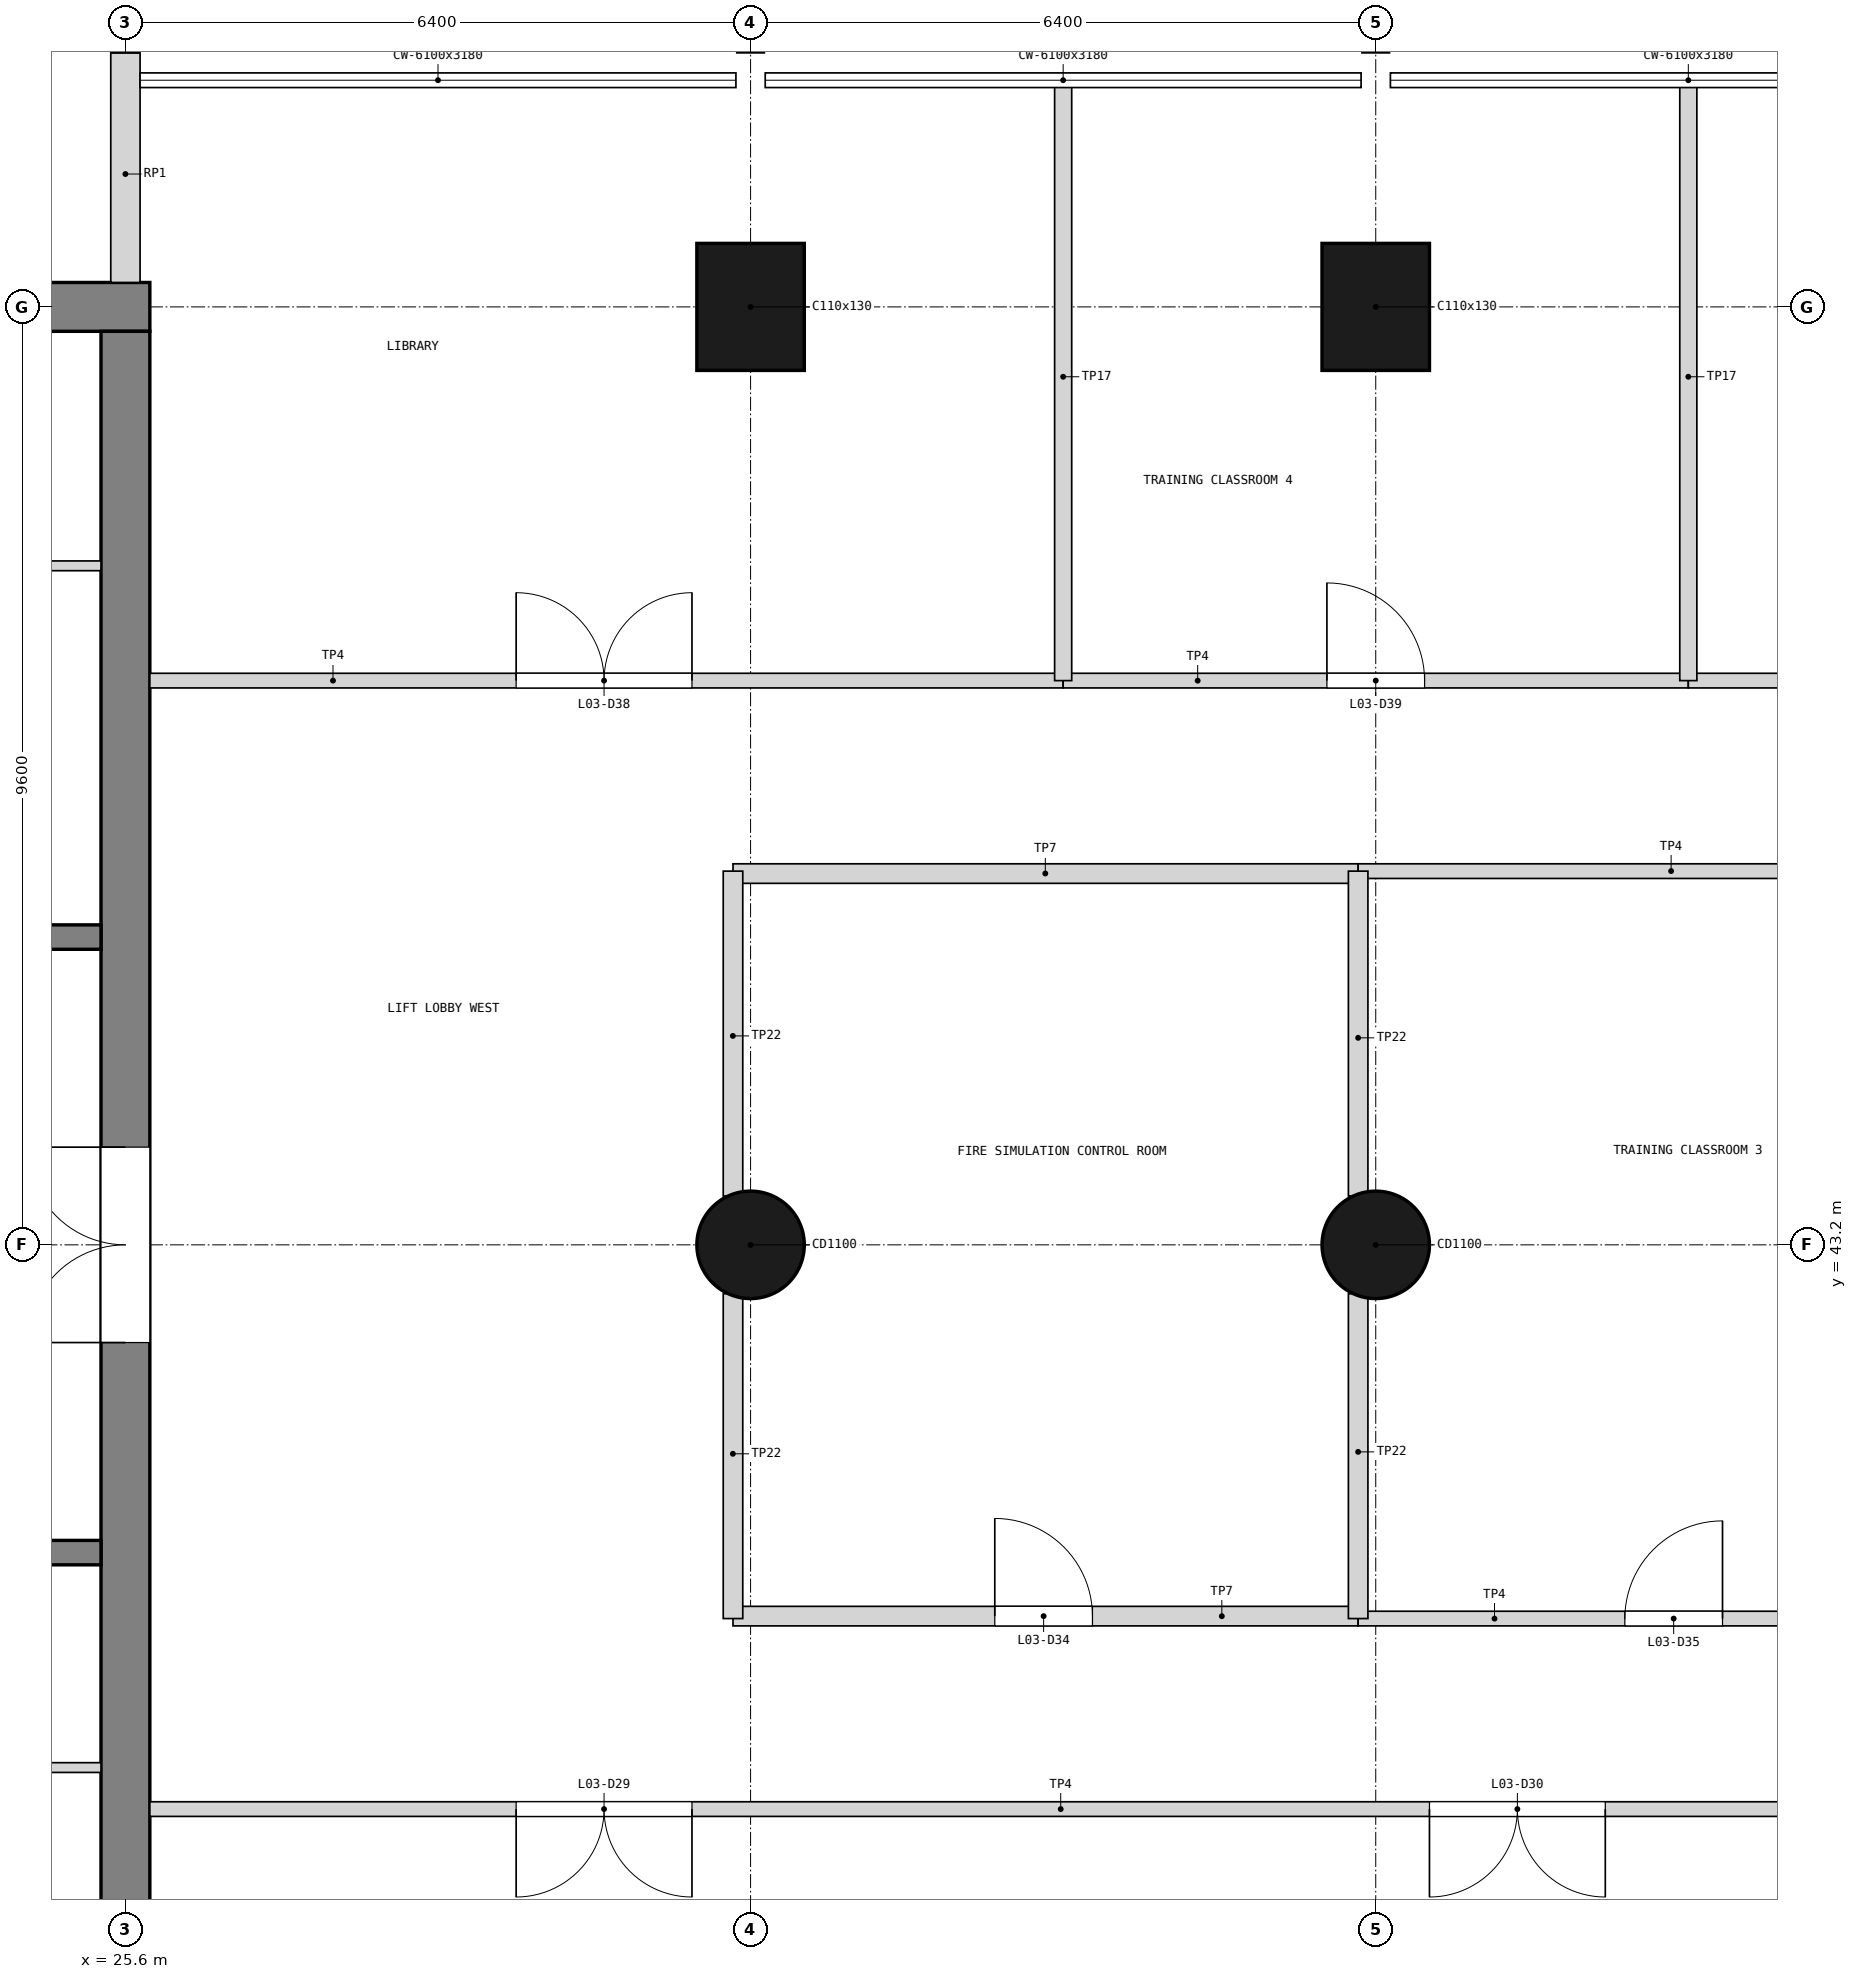
"""IFC4 building model, lengths in metres.
Left out: names, types, materials, properties, quantities, classifications, styles, units other than length and angle.
Written with IfcOpenShell. Run it as: python <this file> out.ifc"""

import sys

from ifc_helpers import new_model, si_unit, direction, frame, frame_2d, origin, origin_2d, place, context, subcontext, project, spatial, rectangle, circle, extrude, element, fill, save


model = new_model("IFC4")
c1 = context("Model", 3, precision=1e-05, world=origin(), true_north=direction((0.0, 1.0)))
c2 = subcontext(c1, "Body", "Model", "MODEL_VIEW")
j1 = project(units=[si_unit("LENGTHUNIT", "METRE"), si_unit("PLANEANGLEUNIT", "RADIAN")], contexts=[c1])
p1 = place(None, origin())
s1 = spatial("IfcSite", under=j1, at=p1, CompositionType="ELEMENT")
p2 = place(p1, origin())
s2 = spatial("IfcBuilding", under=s1, at=p2, CompositionType="ELEMENT")
p3 = place(p2, frame((0.0, 0.0, 12.9)))
s3 = spatial("IfcBuildingStorey", under=s2, at=p3, CompositionType="ELEMENT", Elevation=12.9)
p4 = place(p3, frame((12.55, 52.8, 0.0), z_axis=(0.0, 0.0, 1.0), x_axis=(1.0, 0.0, 0.0)))
e1 = element("IfcWall", 1, at=p4, inside=s3, PredefinedType="SHEAR", context=c2, shape_type="SweptSolid", body=[
    extrude(rectangle(XDim=13.3, YDim=0.5, at=frame_2d((6.65, 0.0))), origin(), (0.0, 0.0, 1.0), 4.2),
])
p5 = place(p4, frame((1.85, 0.0, 1.0)))
e2 = element("IfcOpeningElement", 2, at=p5, cuts=e1, PredefinedType="OPENING", context=c2, shape_type="SweptSolid", body=[
    extrude(rectangle(XDim=0.4, YDim=2.0, at=frame_2d((0.2, 1.0))), frame((0.0, 0.26, 0.0), z_axis=(0.0, -1.0, 0.0), x_axis=(1.0, 0.0, 0.0)), (0.0, 0.0, 1.0), 0.52),
])
p6 = place(p3, frame((25.6, 33.85, 0.0), z_axis=(0.0, 0.0, 1.0), x_axis=(0.0, 1.0, 0.0)))
e3 = element("IfcWall", 3, at=p6, inside=s3, PredefinedType="SHEAR", context=c2, shape_type="SweptSolid", body=[
    extrude(rectangle(XDim=18.7, YDim=0.5, at=frame_2d((9.35, 0.0))), origin(), (0.0, 0.0, 1.0), 4.2),
])
p7 = place(p6, frame((8.35, 0.0, 0.0)))
e4 = element("IfcOpeningElement", 4, at=p7, cuts=e3, PredefinedType="OPENING", context=c2, shape_type="SweptSolid", body=[
    extrude(rectangle(XDim=2.0, YDim=2.1, at=frame_2d((1.0, 1.05))), frame((0.0, 0.26, 0.0), z_axis=(0.0, -1.0, 0.0), x_axis=(1.0, 0.0, 0.0)), (0.0, 0.0, 1.0), 0.52),
])
p8 = place(p3, frame((32.0, 43.2, 0.0), z_axis=(0.0, 0.0, 1.0), x_axis=(1.0, 0.0, 0.0)))
e5 = element("IfcColumn", 5, at=p8, inside=s3, PredefinedType="COLUMN", context=c2, shape_type="SweptSolid", body=[
    extrude(circle(Radius=0.55, at=origin_2d()), origin(), (0.0, 0.0, 1.0), 4.2),
])
p9 = place(p3, frame((32.0, 52.8, 0.0), z_axis=(0.0, 0.0, 1.0), x_axis=(1.0, 0.0, 0.0)))
e6 = element("IfcColumn", 6, at=p9, inside=s3, PredefinedType="COLUMN", context=c2, shape_type="SweptSolid", body=[
    extrude(rectangle(XDim=1.1, YDim=1.3, at=origin_2d()), origin(), (0.0, 0.0, 1.0), 4.2),
])
p10 = place(p3, frame((38.4, 43.2, 0.0), z_axis=(0.0, 0.0, 1.0), x_axis=(1.0, 0.0, 0.0)))
e7 = element("IfcColumn", 7, at=p10, inside=s3, PredefinedType="COLUMN", context=c2, shape_type="SweptSolid", body=[
    extrude(circle(Radius=0.55, at=origin_2d()), origin(), (0.0, 0.0, 1.0), 4.2),
])
p11 = place(p3, frame((38.4, 52.8, 0.0), z_axis=(0.0, 0.0, 1.0), x_axis=(1.0, 0.0, 0.0)))
e8 = element("IfcColumn", 8, at=p11, inside=s3, PredefinedType="COLUMN", context=c2, shape_type="SweptSolid", body=[
    extrude(rectangle(XDim=1.1, YDim=1.3, at=origin_2d()), origin(), (0.0, 0.0, 1.0), 4.2),
])
p12 = place(p3, frame((25.6, 53.05, 0.0), z_axis=(0.0, 0.0, 1.0), x_axis=(0.0, 1.0, 0.0)))
e9 = element("IfcWall", 9, at=p12, inside=s3, PredefinedType="SOLIDWALL", context=c2, shape_type="SweptSolid", body=[
    extrude(rectangle(XDim=2.35, YDim=0.3, at=frame_2d((1.175, 0.0))), origin(), (0.0, 0.0, 1.0), 3.18),
])
for number, where, z_axis, x_axis in (
    (10, (19.875, 40.05, 0.0), (0.0, 0.0, 1.0), (1.0, 0.0, 0.0)),
    (11, (19.875, 46.35, 0.0), (0.0, 0.0, 1.0), (1.0, 0.0, 0.0)),
):
    element("IfcWall", number, at=place(p3, frame(where, z_axis=z_axis, x_axis=x_axis)), inside=s3, PredefinedType="SOLIDWALL", context=c2, shape_type="SweptSolid", body=[
        extrude(rectangle(XDim=5.475, YDim=0.25, at=frame_2d((2.738, 0.0))), origin(), (0.0, 0.0, 1.0), 3.9),
    ])
p13 = place(p3, frame((21.675, 37.85, 0.0), z_axis=(0.0, 0.0, 1.0), x_axis=(1.0, 0.0, 0.0)))
e12 = element("IfcWall", 12, at=p13, inside=s3, PredefinedType="PARTITIONING", context=c2, shape_type="SweptSolid", body=[
    extrude(rectangle(XDim=3.675, YDim=0.1, at=frame_2d((1.837, 0.0))), origin(), (0.0, 0.0, 1.0), 3.9),
])
p14 = place(p3, frame((20.125, 50.15, 0.0), z_axis=(0.0, 0.0, 1.0), x_axis=(1.0, 0.0, 0.0)))
e13 = element("IfcWall", 13, at=p14, inside=s3, PredefinedType="PARTITIONING", context=c2, shape_type="SweptSolid", body=[
    extrude(rectangle(XDim=5.225, YDim=0.1, at=frame_2d((2.613, 0.0))), origin(), (0.0, 0.0, 1.0), 3.9),
])
p15 = place(p3, frame((25.85, 37.425, 0.0), z_axis=(0.0, 0.0, 1.0), x_axis=(1.0, 0.0, 0.0)))
e14 = element("IfcWall", 14, at=p15, inside=s3, PredefinedType="PARTITIONING", context=c2, shape_type="SweptSolid", body=[
    extrude(rectangle(XDim=18.77, YDim=0.15, at=frame_2d((9.385, 0.0))), origin(), (0.0, 0.0, 1.0), 3.98),
])
p16 = place(p15, frame((3.75, 0.0, 0.0)))
e15 = element("IfcOpeningElement", 15, at=p16, cuts=e14, PredefinedType="OPENING", context=c2, shape_type="SweptSolid", body=[
    extrude(rectangle(XDim=1.8, YDim=2.1, at=frame_2d((0.9, 1.05))), frame((0.0, 0.085, 0.0), z_axis=(0.0, -1.0, 0.0), x_axis=(1.0, 0.0, 0.0)), (0.0, 0.0, 1.0), 0.17),
])
p17 = place(p15, frame((13.1, 0.0, 0.0)))
e16 = element("IfcOpeningElement", 16, at=p17, cuts=e14, PredefinedType="OPENING", context=c2, shape_type="SweptSolid", body=[
    extrude(rectangle(XDim=1.8, YDim=2.1, at=frame_2d((0.9, 1.05))), frame((0.0, 0.085, 0.0), z_axis=(0.0, -1.0, 0.0), x_axis=(1.0, 0.0, 0.0)), (0.0, 0.0, 1.0), 0.17),
])
p18 = place(p3, frame((31.82, 39.4, 0.0), z_axis=(0.0, 0.0, 1.0), x_axis=(1.0, 0.0, 0.0)))
e17 = element("IfcWall", 17, at=p18, inside=s3, PredefinedType="PARTITIONING", context=c2, shape_type="SweptSolid", body=[
    extrude(rectangle(XDim=6.4, YDim=0.2, at=frame_2d((3.2, 0.0))), origin(), (0.0, 0.0, 1.0), 3.98),
])
p19 = place(p18, frame((2.68, 0.0, 0.0)))
e18 = element("IfcOpeningElement", 18, at=p19, cuts=e17, PredefinedType="OPENING", context=c2, shape_type="SweptSolid", body=[
    extrude(rectangle(XDim=1.0, YDim=2.1, at=frame_2d((0.5, 1.05))), frame((0.0, 0.11, 0.0), z_axis=(0.0, -1.0, 0.0), x_axis=(1.0, 0.0, 0.0)), (0.0, 0.0, 1.0), 0.22),
])
p20 = place(p3, frame((31.82, 47.0, 0.0), z_axis=(0.0, 0.0, 1.0), x_axis=(1.0, 0.0, 0.0)))
e19 = element("IfcWall", 19, at=p20, inside=s3, PredefinedType="PARTITIONING", context=c2, shape_type="SweptSolid", body=[
    extrude(rectangle(XDim=6.4, YDim=0.2, at=frame_2d((3.2, 0.0))), origin(), (0.0, 0.0, 1.0), 3.98),
])
p21 = place(p3, frame((38.22, 39.375, 0.0), z_axis=(0.0, 0.0, 1.0), x_axis=(1.0, 0.0, 0.0)))
e20 = element("IfcWall", 20, at=p21, inside=s3, PredefinedType="PARTITIONING", context=c2, shape_type="SweptSolid", body=[
    extrude(rectangle(XDim=6.4, YDim=0.15, at=frame_2d((3.2, 0.0))), origin(), (0.0, 0.0, 1.0), 3.98),
])
p22 = place(p21, frame((2.73, 0.0, 0.0)))
e21 = element("IfcOpeningElement", 21, at=p22, cuts=e20, PredefinedType="OPENING", context=c2, shape_type="SweptSolid", body=[
    extrude(rectangle(XDim=1.0, YDim=2.1, at=frame_2d((0.5, 1.05))), frame((0.0, 0.085, 0.0), z_axis=(0.0, -1.0, 0.0), x_axis=(1.0, 0.0, 0.0)), (0.0, 0.0, 1.0), 0.17),
])
p23 = place(p3, frame((38.22, 47.025, 0.0), z_axis=(0.0, 0.0, 1.0), x_axis=(1.0, 0.0, 0.0)))
e22 = element("IfcWall", 22, at=p23, inside=s3, PredefinedType="PARTITIONING", context=c2, shape_type="SweptSolid", body=[
    extrude(rectangle(XDim=6.4, YDim=0.15, at=frame_2d((3.2, 0.0))), origin(), (0.0, 0.0, 1.0), 3.98),
])
for number, where, z_axis, x_axis in (
    (23, (38.22, 39.375, 0.0), (0.0, 0.0, 1.0), (0.0, 1.0, 0.0)),
    (24, (38.22, 43.7, 0.0), (0.0, 0.0, 1.0), (0.0, 1.0, 0.0)),
):
    element("IfcWall", number, at=place(p3, frame(where, z_axis=z_axis, x_axis=x_axis)), inside=s3, PredefinedType="PARTITIONING", context=c2, shape_type="SweptSolid", body=[
        extrude(rectangle(XDim=3.325, YDim=0.2, at=frame_2d((1.663, 0.0))), origin(), (0.0, 0.0, 1.0), 3.08),
    ])
p24 = place(p3, frame((25.85, 48.975, 0.0), z_axis=(0.0, 0.0, 1.0), x_axis=(1.0, 0.0, 0.0)))
e25 = element("IfcWall", 25, at=p24, inside=s3, PredefinedType="PARTITIONING", context=c2, shape_type="SweptSolid", body=[
    extrude(rectangle(XDim=9.35, YDim=0.15, at=frame_2d((4.675, 0.0))), origin(), (0.0, 0.0, 1.0), 3.98),
])
p25 = place(p24, frame((3.75, 0.0, 0.0)))
e26 = element("IfcOpeningElement", 26, at=p25, cuts=e25, PredefinedType="OPENING", context=c2, shape_type="SweptSolid", body=[
    extrude(rectangle(XDim=1.8, YDim=2.1, at=frame_2d((0.9, 1.05))), frame((0.0, 0.085, 0.0), z_axis=(0.0, -1.0, 0.0), x_axis=(1.0, 0.0, 0.0)), (0.0, 0.0, 1.0), 0.17),
])
p26 = place(p3, frame((35.2, 48.975, 0.0), z_axis=(0.0, 0.0, 1.0), x_axis=(1.0, 0.0, 0.0)))
e27 = element("IfcWall", 27, at=p26, inside=s3, PredefinedType="PARTITIONING", context=c2, shape_type="SweptSolid", body=[
    extrude(rectangle(XDim=6.4, YDim=0.15, at=frame_2d((3.2, 0.0))), origin(), (0.0, 0.0, 1.0), 3.98),
])
p27 = place(p26, frame((2.7, 0.0, 0.0)))
e28 = element("IfcOpeningElement", 28, at=p27, cuts=e27, PredefinedType="OPENING", context=c2, shape_type="SweptSolid", body=[
    extrude(rectangle(XDim=1.0, YDim=2.1, at=frame_2d((0.5, 1.05))), frame((0.0, 0.085, 0.0), z_axis=(0.0, -1.0, 0.0), x_axis=(1.0, 0.0, 0.0)), (0.0, 0.0, 1.0), 0.17),
])
p28 = place(p3, frame((41.6, 48.975, 0.0), z_axis=(0.0, 0.0, 1.0), x_axis=(1.0, 0.0, 0.0)))
e29 = element("IfcWall", 29, at=p28, inside=s3, PredefinedType="PARTITIONING", context=c2, shape_type="SweptSolid", body=[
    extrude(rectangle(XDim=6.4, YDim=0.15, at=frame_2d((3.2, 0.0))), origin(), (0.0, 0.0, 1.0), 3.98),
])
p29 = place(p28, frame((2.7, 0.0, 0.0)))
e30 = element("IfcOpeningElement", 30, at=p29, cuts=e29, PredefinedType="OPENING", context=c2, shape_type="SweptSolid", body=[
    extrude(rectangle(XDim=1.0, YDim=2.1, at=frame_2d((0.5, 1.05))), frame((0.0, 0.085, 0.0), z_axis=(0.0, -1.0, 0.0), x_axis=(1.0, 0.0, 0.0)), (0.0, 0.0, 1.0), 0.17),
])
for number, where, z_axis, x_axis in (
    (31, (35.2, 48.975, 0.0), (0.0, 0.0, 1.0), (0.0, 1.0, 0.0)),
    (32, (41.6, 48.975, 0.0), (0.0, 0.0, 1.0), (0.0, 1.0, 0.0)),
):
    element("IfcWall", number, at=place(p3, frame(where, z_axis=z_axis, x_axis=x_axis)), inside=s3, PredefinedType="PARTITIONING", context=c2, shape_type="SweptSolid", body=[
        extrude(rectangle(XDim=6.125, YDim=0.175, at=frame_2d((3.062, 0.0))), origin(), (0.0, 0.0, 1.0), 3.38),
    ])
for number, where, z_axis, x_axis in (
    (33, (31.82, 39.375, 0.0), (0.0, 0.0, 1.0), (0.0, 1.0, 0.0)),
    (34, (31.82, 43.7, 0.0), (0.0, 0.0, 1.0), (0.0, 1.0, 0.0)),
):
    element("IfcWall", number, at=place(p3, frame(where, z_axis=z_axis, x_axis=x_axis)), inside=s3, PredefinedType="PARTITIONING", context=c2, shape_type="SweptSolid", body=[
        extrude(rectangle(XDim=3.325, YDim=0.2, at=frame_2d((1.663, 0.0))), origin(), (0.0, 0.0, 1.0), 3.08),
    ])
p30 = place(p7, origin())
e35 = element("IfcDoor", 35, at=p30, inside=s3, OperationType="DOUBLE_DOOR_SINGLE_SWING", PredefinedType="DOOR", context=c2, shape_type="SweptSolid", body=[
    extrude(rectangle(XDim=2.0, YDim=2.1, at=frame_2d((1.0, 1.05))), frame((0.0, 0.025, 0.0), z_axis=(0.0, -1.0, 0.0), x_axis=(1.0, 0.0, 0.0)), (0.0, 0.0, 1.0), 0.05),
])
fill(e4, e35)
p31 = place(p16, frame((1.8, 0.0, 0.0), z_axis=(0.0, 0.0, 1.0), x_axis=(-1.0, 0.0, 0.0)))
e36 = element("IfcDoor", 36, at=p31, inside=s3, OperationType="DOUBLE_DOOR_SINGLE_SWING", PredefinedType="DOOR", context=c2, shape_type="SweptSolid", body=[
    extrude(rectangle(XDim=1.8, YDim=2.1, at=frame_2d((0.9, 1.05))), frame((0.0, 0.025, 0.0), z_axis=(0.0, -1.0, 0.0), x_axis=(1.0, 0.0, 0.0)), (0.0, 0.0, 1.0), 0.05),
])
fill(e15, e36)
p32 = place(p17, frame((1.8, 0.0, 0.0), z_axis=(0.0, 0.0, 1.0), x_axis=(-1.0, 0.0, 0.0)))
e37 = element("IfcDoor", 37, at=p32, inside=s3, OperationType="DOUBLE_DOOR_SINGLE_SWING", PredefinedType="DOOR", context=c2, shape_type="SweptSolid", body=[
    extrude(rectangle(XDim=1.8, YDim=2.1, at=frame_2d((0.9, 1.05))), frame((0.0, 0.025, 0.0), z_axis=(0.0, -1.0, 0.0), x_axis=(1.0, 0.0, 0.0)), (0.0, 0.0, 1.0), 0.05),
])
fill(e16, e37)
p33 = place(p19, origin())
e38 = element("IfcDoor", 38, at=p33, inside=s3, OperationType="SINGLE_SWING_LEFT", PredefinedType="DOOR", context=c2, shape_type="SweptSolid", body=[
    extrude(rectangle(XDim=1.0, YDim=2.1, at=frame_2d((0.5, 1.05))), frame((0.0, 0.025, 0.0), z_axis=(0.0, -1.0, 0.0), x_axis=(1.0, 0.0, 0.0)), (0.0, 0.0, 1.0), 0.05),
])
fill(e18, e38)
p34 = place(p22, origin())
e39 = element("IfcDoor", 39, at=p34, inside=s3, OperationType="SINGLE_SWING_RIGHT", PredefinedType="DOOR", context=c2, shape_type="SweptSolid", body=[
    extrude(rectangle(XDim=1.0, YDim=2.1, at=frame_2d((0.5, 1.05))), frame((0.0, 0.025, 0.0), z_axis=(0.0, -1.0, 0.0), x_axis=(1.0, 0.0, 0.0)), (0.0, 0.0, 1.0), 0.05),
])
fill(e21, e39)
p35 = place(p25, origin())
e40 = element("IfcDoor", 40, at=p35, inside=s3, OperationType="DOUBLE_DOOR_SINGLE_SWING", PredefinedType="DOOR", context=c2, shape_type="SweptSolid", body=[
    extrude(rectangle(XDim=1.8, YDim=2.1, at=frame_2d((0.9, 1.05))), frame((0.0, 0.025, 0.0), z_axis=(0.0, -1.0, 0.0), x_axis=(1.0, 0.0, 0.0)), (0.0, 0.0, 1.0), 0.05),
])
fill(e26, e40)
p36 = place(p27, origin())
e41 = element("IfcDoor", 41, at=p36, inside=s3, OperationType="SINGLE_SWING_LEFT", PredefinedType="DOOR", context=c2, shape_type="SweptSolid", body=[
    extrude(rectangle(XDim=1.0, YDim=2.1, at=frame_2d((0.5, 1.05))), frame((0.0, 0.025, 0.0), z_axis=(0.0, -1.0, 0.0), x_axis=(1.0, 0.0, 0.0)), (0.0, 0.0, 1.0), 0.05),
])
fill(e28, e41)
save(model, sys.argv[1])
